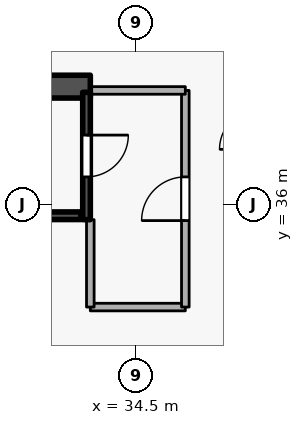
"""IFC4 building model, lengths in metres.
Left out: names, types, materials, properties, quantities, classifications, styles, units other than length and angle.
Written with IfcOpenShell. Run it as: python <this file> out.ifc"""

import sys

from ifc_helpers import new_model, si_unit, direction, frame, frame_2d, origin, place, context, subcontext, project, spatial, rectangle, extrude, element, fill, save


model = new_model("IFC4")
c1 = context("Model", 3, precision=1e-05, world=origin(), true_north=direction((0.0, 1.0)))
c2 = subcontext(c1, "Body", "Model", "MODEL_VIEW")
j1 = project(units=[si_unit("LENGTHUNIT", "METRE"), si_unit("PLANEANGLEUNIT", "RADIAN")], contexts=[c1])
p1 = place(None, origin())
s1 = spatial("IfcSite", under=j1, at=p1, CompositionType="ELEMENT")
p2 = place(p1, origin())
s2 = spatial("IfcBuilding", under=s1, at=p2, CompositionType="ELEMENT")
p3 = place(p2, frame((0.0, 0.0, 98.1)))
s3 = spatial("IfcBuildingStorey", under=s2, at=p3, CompositionType="ELEMENT", Elevation=98.1)
p4 = place(p3, frame((17.7, 39.1, 0.0), z_axis=(0.0, 0.0, 1.0), x_axis=(1.0, 0.0, 0.0)))
e1 = element("IfcWall", 1, at=p4, inside=s3, PredefinedType="SHEAR", context=c2, shape_type="SweptSolid", body=[
    extrude(rectangle(XDim=15.6, YDim=0.6, at=frame_2d((7.8, 0.0))), origin(), (0.0, 0.0, 1.0), 3.6),
])
p5 = place(p3, frame((33.2, 38.95, 0.0), z_axis=(0.0, 0.0, 1.0), x_axis=(0.0, -1.0, 0.0)))
e2 = element("IfcWall", 2, at=p5, inside=s3, PredefinedType="SHEAR", context=c2, shape_type="SweptSolid", body=[
    extrude(rectangle(XDim=3.35, YDim=0.2, at=frame_2d((1.675, 0.0))), origin(), (0.0, 0.0, 1.0), 3.6),
])
p6 = place(p5, frame((1.125, 0.0, 0.0)))
e3 = element("IfcOpeningElement", 3, at=p6, cuts=e2, PredefinedType="OPENING", context=c2, shape_type="SweptSolid", body=[
    extrude(rectangle(XDim=1.1, YDim=2.1, at=frame_2d((0.55, 1.05))), frame((0.0, 0.11, 0.0), z_axis=(0.0, -1.0, 0.0), x_axis=(1.0, 0.0, 0.0)), (0.0, 0.0, 1.0), 0.22),
])
p7 = place(p3, frame((25.95, 35.703, 0.0), z_axis=(0.0, 0.0, 1.0), x_axis=(1.0, 0.0, 0.0)))
e4 = element("IfcWall", 4, at=p7, inside=s3, PredefinedType="SHEAR", context=c2, shape_type="SweptSolid", body=[
    extrude(rectangle(XDim=7.1, YDim=0.2, at=frame_2d((3.55, 0.0))), origin(), (0.0, 0.0, 1.0), 3.6),
])
p8 = place(p3, frame((33.3, 33.3, 0.0), z_axis=(0.0, 0.0, 1.0), x_axis=(1.0, 0.0, 0.0)))
e5 = element("IfcWall", 5, at=p8, inside=s3, PredefinedType="STANDARD", context=c2, shape_type="SweptSolid", body=[
    extrude(rectangle(XDim=2.5, YDim=0.2, at=frame_2d((1.25, 0.0))), origin(), (0.0, 0.0, 1.0), 3.3),
])
p9 = place(p3, frame((35.8, 33.3, 0.0), z_axis=(0.0, 0.0, 1.0), x_axis=(0.0, 1.0, 0.0)))
e6 = element("IfcWall", 6, at=p9, inside=s3, PredefinedType="STANDARD", context=c2, shape_type="SweptSolid", body=[
    extrude(rectangle(XDim=5.7, YDim=0.2, at=frame_2d((2.85, 0.0))), origin(), (0.0, 0.0, 1.0), 3.3),
])
p10 = place(p9, frame((2.275, 0.0, 0.0)))
e7 = element("IfcOpeningElement", 7, at=p10, cuts=e6, PredefinedType="OPENING", context=c2, shape_type="SweptSolid", body=[
    extrude(rectangle(XDim=1.15, YDim=2.1, at=frame_2d((0.575, 1.05))), frame((0.0, 0.11, 0.0), z_axis=(0.0, -1.0, 0.0), x_axis=(1.0, 0.0, 0.0)), (0.0, 0.0, 1.0), 0.22),
])
p11 = place(p3, frame((35.8, 39.0, 0.0), z_axis=(0.0, 0.0, 1.0), x_axis=(-1.0, 0.0, 0.0)))
e8 = element("IfcWall", 8, at=p11, inside=s3, PredefinedType="STANDARD", context=c2, shape_type="SweptSolid", body=[
    extrude(rectangle(XDim=2.5, YDim=0.2, at=frame_2d((1.25, 0.0))), origin(), (0.0, 0.0, 1.0), 3.3),
])
p12 = place(p3, frame((33.3, 35.6, 0.0), z_axis=(0.0, 0.0, 1.0), x_axis=(0.0, -1.0, 0.0)))
e9 = element("IfcWall", 9, at=p12, inside=s3, PredefinedType="STANDARD", context=c2, shape_type="SweptSolid", body=[
    extrude(rectangle(XDim=2.3, YDim=0.2, at=frame_2d((1.15, 0.0))), origin(), (0.0, 0.0, 1.0), 2.505),
])
p13 = place(p6, origin())
e10 = element("IfcDoor", 10, at=p13, inside=s3, OperationType="SINGLE_SWING_LEFT", PredefinedType="DOOR", context=c2, shape_type="SweptSolid", body=[
    extrude(rectangle(XDim=1.1, YDim=2.1, at=frame_2d((0.55, 1.05))), frame((0.0, 0.025, 0.0), z_axis=(0.0, -1.0, 0.0), x_axis=(1.0, 0.0, 0.0)), (0.0, 0.0, 1.0), 0.05),
])
fill(e3, e10)
p14 = place(p10, origin())
e11 = element("IfcDoor", 11, at=p14, inside=s3, OperationType="SINGLE_SWING_LEFT", PredefinedType="DOOR", context=c2, shape_type="SweptSolid", body=[
    extrude(rectangle(XDim=1.15, YDim=2.1, at=frame_2d((0.575, 1.05))), frame((0.0, 0.025, 0.0), z_axis=(0.0, -1.0, 0.0), x_axis=(1.0, 0.0, 0.0)), (0.0, 0.0, 1.0), 0.05),
])
fill(e7, e11)
save(model, sys.argv[1])
